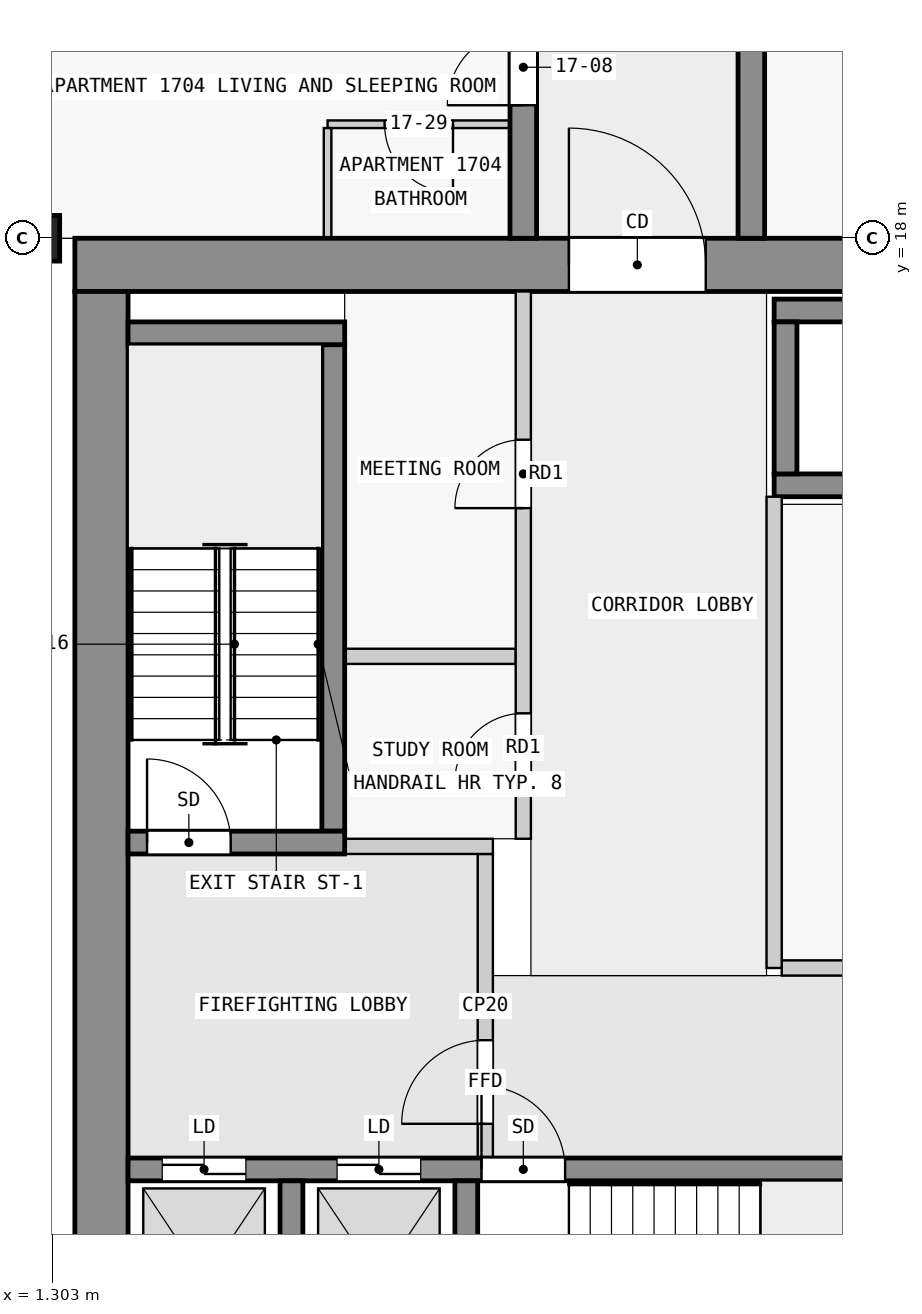
"""IFC4 building model, lengths in metres.
Left out: names, types, materials, properties, quantities, classifications, styles, units other than length and angle.
Written with IfcOpenShell. Run it as: python <this file> out.ifc"""

import sys

from ifc_helpers import new_model, si_unit, direction, frame, frame_2d, origin, origin_2d, place, context, subcontext, project, spatial, rectangle, extrude, element, fill, save


model = new_model("IFC4")
c1 = context("Model", 3, precision=1e-05, world=origin(), true_north=direction((0.0, 1.0)))
c2 = subcontext(c1, "Body", "Model", "MODEL_VIEW")
j1 = project(units=[si_unit("LENGTHUNIT", "METRE"), si_unit("PLANEANGLEUNIT", "RADIAN")], contexts=[c1])
p1 = place(None, origin())
s1 = spatial("IfcSite", under=j1, at=p1, CompositionType="ELEMENT")
p2 = place(p1, origin())
s2 = spatial("IfcBuilding", under=s1, at=p2, CompositionType="ELEMENT")
p3 = place(p2, frame((0.0, 0.0, 68.8)))
s3 = spatial("IfcBuildingStorey", under=s2, at=p3, CompositionType="ELEMENT", Elevation=68.8)
p4 = place(p3, frame((0.7, 18.0, 0.0), z_axis=(0.0, 0.0, 1.0), x_axis=(0.0, 1.0, 0.0)))
e1 = element("IfcColumn", 1, at=p4, inside=s3, PredefinedType="COLUMN", context=c2, shape_type="SweptSolid", body=[
    extrude(rectangle(XDim=0.6, YDim=1.4, at=origin_2d()), origin(), (0.0, 0.0, 1.0), 3.5),
])
p5 = place(p3, frame((1.6, 17.65, 0.0), z_axis=(0.0, 0.0, 1.0), x_axis=(1.0, 0.0, 0.0)))
e2 = element("IfcWall", 2, at=p5, inside=s3, PredefinedType="SHEAR", context=c2, shape_type="SweptSolid", body=[
    extrude(rectangle(XDim=20.9, YDim=0.7, at=frame_2d((10.45, 0.0))), origin(), (0.0, 0.0, 1.0), 3.2),
])
p6 = place(p5, frame((6.5, 0.0, 0.0)))
e3 = element("IfcOpeningElement", 3, at=p6, cuts=e2, PredefinedType="OPENING", context=c2, shape_type="SweptSolid", body=[
    extrude(rectangle(XDim=1.8, YDim=2.1, at=frame_2d((0.9, 1.05))), frame((0.0, 0.36, 0.0), z_axis=(0.0, -1.0, 0.0), x_axis=(1.0, 0.0, 0.0)), (0.0, 0.0, 1.0), 0.72),
])
p7 = place(p3, frame((1.95, 2.5, 0.0), z_axis=(0.0, 0.0, 1.0), x_axis=(0.0, 1.0, 0.0)))
e4 = element("IfcWall", 4, at=p7, inside=s3, PredefinedType="SHEAR", context=c2, shape_type="SweptSolid", body=[
    extrude(rectangle(XDim=14.8, YDim=0.7, at=frame_2d((7.4, 0.0))), origin(), (0.0, 0.0, 1.0), 3.2),
])
for number, where, z_axis, x_axis in (
    (5, (4.45, 2.8, 0.0), (0.0, 0.0, 1.0), (0.0, 1.0, 0.0)),
    (6, (6.75, 2.8, 0.0), (0.0, 0.0, 1.0), (0.0, 1.0, 0.0)),
):
    element("IfcWall", number, at=place(p3, frame(where, z_axis=z_axis, x_axis=x_axis)), inside=s3, PredefinedType="SHEAR", context=c2, shape_type="SweptSolid", body=[
        extrude(rectangle(XDim=2.8, YDim=0.3, at=frame_2d((1.4, 0.0))), origin(), (0.0, 0.0, 1.0), 3.2),
    ])
p8 = place(p3, frame((2.3, 5.75, 0.0), z_axis=(0.0, 0.0, 1.0), x_axis=(1.0, 0.0, 0.0)))
e7 = element("IfcWall", 7, at=p8, inside=s3, PredefinedType="SHEAR", context=c2, shape_type="SweptSolid", body=[
    extrude(rectangle(XDim=18.8, YDim=0.3, at=frame_2d((9.4, 0.0))), origin(), (0.0, 0.0, 1.0), 3.2),
])
p9 = place(p8, frame((4.65, 0.0, 0.0)))
e8 = element("IfcOpeningElement", 8, at=p9, cuts=e7, PredefinedType="OPENING", context=c2, shape_type="SweptSolid", body=[
    extrude(rectangle(XDim=1.1, YDim=2.1, at=frame_2d((0.55, 1.05))), frame((0.0, 0.16, 0.0), z_axis=(0.0, -1.0, 0.0), x_axis=(1.0, 0.0, 0.0)), (0.0, 0.0, 1.0), 0.32),
])
p10 = place(p8, frame((0.45, 0.0, 0.0)))
e9 = element("IfcOpeningElement", 9, at=p10, cuts=e7, PredefinedType="OPENING", context=c2, shape_type="SweptSolid", body=[
    extrude(rectangle(XDim=1.1, YDim=2.1, at=frame_2d((0.55, 1.05))), frame((0.0, 0.16, 0.0), z_axis=(0.0, -1.0, 0.0), x_axis=(1.0, 0.0, 0.0)), (0.0, 0.0, 1.0), 0.32),
])
p11 = place(p8, frame((2.75, 0.0, 0.0)))
e10 = element("IfcOpeningElement", 10, at=p11, cuts=e7, PredefinedType="OPENING", context=c2, shape_type="SweptSolid", body=[
    extrude(rectangle(XDim=1.1, YDim=2.1, at=frame_2d((0.55, 1.05))), frame((0.0, 0.16, 0.0), z_axis=(0.0, -1.0, 0.0), x_axis=(1.0, 0.0, 0.0)), (0.0, 0.0, 1.0), 0.32),
])
p12 = place(p8, frame((11.85, 0.0, 0.0)))
e11 = element("IfcOpeningElement", 11, at=p12, cuts=e7, PredefinedType="OPENING", context=c2, shape_type="SweptSolid", body=[
    extrude(rectangle(XDim=1.1, YDim=2.1, at=frame_2d((0.55, 1.05))), frame((0.0, 0.16, 0.0), z_axis=(0.0, -1.0, 0.0), x_axis=(1.0, 0.0, 0.0)), (0.0, 0.0, 1.0), 0.32),
])
p13 = place(p8, frame((14.35, 0.0, 0.0)))
e12 = element("IfcOpeningElement", 12, at=p13, cuts=e7, PredefinedType="OPENING", context=c2, shape_type="SweptSolid", body=[
    extrude(rectangle(XDim=1.1, YDim=2.1, at=frame_2d((0.55, 1.05))), frame((0.0, 0.16, 0.0), z_axis=(0.0, -1.0, 0.0), x_axis=(1.0, 0.0, 0.0)), (0.0, 0.0, 1.0), 0.32),
])
p14 = place(p8, frame((16.85, 0.0, 0.0)))
e13 = element("IfcOpeningElement", 13, at=p14, cuts=e7, PredefinedType="OPENING", context=c2, shape_type="SweptSolid", body=[
    extrude(rectangle(XDim=1.1, YDim=2.1, at=frame_2d((0.55, 1.05))), frame((0.0, 0.16, 0.0), z_axis=(0.0, -1.0, 0.0), x_axis=(1.0, 0.0, 0.0)), (0.0, 0.0, 1.0), 0.32),
])
p15 = place(p3, frame((2.3, 10.05, 0.0), z_axis=(0.0, 0.0, 1.0), x_axis=(1.0, 0.0, 0.0)))
e14 = element("IfcWall", 14, at=p15, inside=s3, PredefinedType="SHEAR", context=c2, shape_type="SweptSolid", body=[
    extrude(rectangle(XDim=2.85, YDim=0.3, at=frame_2d((1.425, 0.0))), origin(), (0.0, 0.0, 1.0), 3.2),
])
p16 = place(p15, frame((0.25, 0.0, 0.0)))
e15 = element("IfcOpeningElement", 15, at=p16, cuts=e14, PredefinedType="OPENING", context=c2, shape_type="SweptSolid", body=[
    extrude(rectangle(XDim=1.1, YDim=2.1, at=frame_2d((0.55, 1.05))), frame((0.0, 0.16, 0.0), z_axis=(0.0, -1.0, 0.0), x_axis=(1.0, 0.0, 0.0)), (0.0, 0.0, 1.0), 0.32),
])
p17 = place(p3, frame((5.0, 10.2, 0.0), z_axis=(0.0, 0.0, 1.0), x_axis=(0.0, 1.0, 0.0)))
e16 = element("IfcWall", 16, at=p17, inside=s3, PredefinedType="SHEAR", context=c2, shape_type="SweptSolid", body=[
    extrude(rectangle(XDim=6.4, YDim=0.3, at=frame_2d((3.2, 0.0))), origin(), (0.0, 0.0, 1.0), 3.2),
])
p18 = place(p3, frame((2.3, 16.75, 0.0), z_axis=(0.0, 0.0, 1.0), x_axis=(1.0, 0.0, 0.0)))
e17 = element("IfcWall", 17, at=p18, inside=s3, PredefinedType="SHEAR", context=c2, shape_type="SweptSolid", body=[
    extrude(rectangle(XDim=2.85, YDim=0.3, at=frame_2d((1.425, 0.0))), origin(), (0.0, 0.0, 1.0), 3.2),
])
for number, where, z_axis, x_axis in (
    (18, (10.8, 17.05, 0.0), (0.0, 0.0, 1.0), (1.0, 0.0, 0.0)),
    (19, (10.8, 14.75, 0.0), (0.0, 0.0, 1.0), (1.0, 0.0, 0.0)),
):
    element("IfcWall", number, at=place(p3, frame(where, z_axis=z_axis, x_axis=x_axis)), inside=s3, PredefinedType="SHEAR", context=c2, shape_type="SweptSolid", body=[
        extrude(rectangle(XDim=7.8, YDim=0.3, at=frame_2d((3.9, 0.0))), origin(), (0.0, 0.0, 1.0), 3.2),
    ])
p19 = place(p3, frame((10.95, 14.9, 0.0), z_axis=(0.0, 0.0, 1.0), x_axis=(0.0, 1.0, 0.0)))
e20 = element("IfcWall", 20, at=p19, inside=s3, PredefinedType="SHEAR", context=c2, shape_type="SweptSolid", body=[
    extrude(rectangle(XDim=2.0, YDim=0.3, at=frame_2d((1.0, 0.0))), origin(), (0.0, 0.0, 1.0), 3.2),
])
p20 = place(p3, frame((7.5, 18.0, 0.0), z_axis=(0.0, 0.0, 1.0), x_axis=(0.0, 1.0, 0.0)))
e21 = element("IfcWall", 21, at=p20, inside=s3, PredefinedType="SHEAR", context=c2, shape_type="SweptSolid", body=[
    extrude(rectangle(XDim=27.0, YDim=0.35, at=frame_2d((13.5, 0.0))), origin(), (0.0, 0.0, 1.0), 3.2),
])
p21 = place(p20, frame((1.75, 0.0, 0.0)))
e22 = element("IfcOpeningElement", 22, at=p21, cuts=e21, PredefinedType="OPENING", context=c2, shape_type="SweptSolid", body=[
    extrude(rectangle(XDim=1.0, YDim=2.1, at=frame_2d((0.5, 1.05))), frame((0.0, 0.185, 0.0), z_axis=(0.0, -1.0, 0.0), x_axis=(1.0, 0.0, 0.0)), (0.0, 0.0, 1.0), 0.37),
])
p22 = place(p20, frame((6.25, 0.0, 0.0)))
e23 = element("IfcOpeningElement", 23, at=p22, cuts=e21, PredefinedType="OPENING", context=c2, shape_type="SweptSolid", body=[
    extrude(rectangle(XDim=1.0, YDim=2.1, at=frame_2d((0.5, 1.05))), frame((0.0, 0.185, 0.0), z_axis=(0.0, -1.0, 0.0), x_axis=(1.0, 0.0, 0.0)), (0.0, 0.0, 1.0), 0.37),
])
p23 = place(p20, frame((10.75, 0.0, 0.0)))
e24 = element("IfcOpeningElement", 24, at=p23, cuts=e21, PredefinedType="OPENING", context=c2, shape_type="SweptSolid", body=[
    extrude(rectangle(XDim=1.0, YDim=2.1, at=frame_2d((0.5, 1.05))), frame((0.0, 0.185, 0.0), z_axis=(0.0, -1.0, 0.0), x_axis=(1.0, 0.0, 0.0)), (0.0, 0.0, 1.0), 0.37),
])
p24 = place(p20, frame((17.55, 0.0, 0.0)))
e25 = element("IfcOpeningElement", 25, at=p24, cuts=e21, PredefinedType="OPENING", context=c2, shape_type="SweptSolid", body=[
    extrude(rectangle(XDim=1.0, YDim=2.1, at=frame_2d((0.5, 1.05))), frame((0.0, 0.185, 0.0), z_axis=(0.0, -1.0, 0.0), x_axis=(1.0, 0.0, 0.0)), (0.0, 0.0, 1.0), 0.37),
])
p25 = place(p20, frame((23.25, 0.0, 0.0)))
e26 = element("IfcOpeningElement", 26, at=p25, cuts=e21, PredefinedType="OPENING", context=c2, shape_type="SweptSolid", body=[
    extrude(rectangle(XDim=0.9, YDim=2.1, at=frame_2d((0.45, 1.05))), frame((0.0, 0.185, 0.0), z_axis=(0.0, -1.0, 0.0), x_axis=(1.0, 0.0, 0.0)), (0.0, 0.0, 1.0), 0.37),
])
p26 = place(p20, frame((25.45, 0.0, 0.0)))
e27 = element("IfcOpeningElement", 27, at=p26, cuts=e21, PredefinedType="OPENING", context=c2, shape_type="SweptSolid", body=[
    extrude(rectangle(XDim=1.0, YDim=2.1, at=frame_2d((0.5, 1.05))), frame((0.0, 0.185, 0.0), z_axis=(0.0, -1.0, 0.0), x_axis=(1.0, 0.0, 0.0)), (0.0, 0.0, 1.0), 0.37),
])
p27 = place(p3, frame((10.5, 18.0, 0.0), z_axis=(0.0, 0.0, 1.0), x_axis=(0.0, 1.0, 0.0)))
e28 = element("IfcWall", 28, at=p27, inside=s3, PredefinedType="SHEAR", context=c2, shape_type="SweptSolid", body=[
    extrude(rectangle(XDim=27.0, YDim=0.35, at=frame_2d((13.5, 0.0))), origin(), (0.0, 0.0, 1.0), 3.2),
])
p28 = place(p27, frame((4.05, 0.0, 0.0)))
e29 = element("IfcOpeningElement", 29, at=p28, cuts=e28, PredefinedType="OPENING", context=c2, shape_type="SweptSolid", body=[
    extrude(rectangle(XDim=1.0, YDim=2.1, at=frame_2d((0.5, 1.05))), frame((0.0, 0.185, 0.0), z_axis=(0.0, -1.0, 0.0), x_axis=(1.0, 0.0, 0.0)), (0.0, 0.0, 1.0), 0.37),
])
p29 = place(p27, frame((13.05, 0.0, 0.0)))
e30 = element("IfcOpeningElement", 30, at=p29, cuts=e28, PredefinedType="OPENING", context=c2, shape_type="SweptSolid", body=[
    extrude(rectangle(XDim=1.0, YDim=2.1, at=frame_2d((0.5, 1.05))), frame((0.0, 0.185, 0.0), z_axis=(0.0, -1.0, 0.0), x_axis=(1.0, 0.0, 0.0)), (0.0, 0.0, 1.0), 0.37),
])
p30 = place(p27, frame((21.35, 0.0, 0.0)))
e31 = element("IfcOpeningElement", 31, at=p30, cuts=e28, PredefinedType="OPENING", context=c2, shape_type="SweptSolid", body=[
    extrude(rectangle(XDim=1.0, YDim=2.1, at=frame_2d((0.5, 1.05))), frame((0.0, 0.185, 0.0), z_axis=(0.0, -1.0, 0.0), x_axis=(1.0, 0.0, 0.0)), (0.0, 0.0, 1.0), 0.37),
])
p31 = place(p3, frame((7.0, 5.9, 0.0), z_axis=(0.0, 0.0, 1.0), x_axis=(0.0, 1.0, 0.0)))
e32 = element("IfcWall", 32, at=p31, inside=s3, PredefinedType="PARTITIONING", context=c2, shape_type="SweptSolid", body=[
    extrude(rectangle(XDim=4.0, YDim=0.2, at=frame_2d((2.0, 0.0))), origin(), (0.0, 0.0, 1.0), 3.2),
])
p32 = place(p31, frame((0.45, 0.0, 0.0)))
e33 = element("IfcOpeningElement", 33, at=p32, cuts=e32, PredefinedType="OPENING", context=c2, shape_type="SweptSolid", body=[
    extrude(rectangle(XDim=1.1, YDim=2.1, at=frame_2d((0.55, 1.05))), frame((0.0, 0.11, 0.0), z_axis=(0.0, -1.0, 0.0), x_axis=(1.0, 0.0, 0.0)), (0.0, 0.0, 1.0), 0.22),
])
p33 = place(p3, frame((5.15, 10.0, 0.0), z_axis=(0.0, 0.0, 1.0), x_axis=(1.0, 0.0, 0.0)))
e34 = element("IfcWall", 34, at=p33, inside=s3, PredefinedType="PARTITIONING", context=c2, shape_type="SweptSolid", body=[
    extrude(rectangle(XDim=1.95, YDim=0.2, at=frame_2d((0.975, 0.0))), origin(), (0.0, 0.0, 1.0), 3.2),
])
p34 = place(p3, frame((10.8, 8.4, 0.0), z_axis=(0.0, 0.0, 1.0), x_axis=(0.0, 1.0, 0.0)))
e35 = element("IfcWall", 35, at=p34, inside=s3, PredefinedType="PARTITIONING", context=c2, shape_type="SweptSolid", body=[
    extrude(rectangle(XDim=6.2, YDim=0.2, at=frame_2d((3.1, 0.0))), origin(), (0.0, 0.0, 1.0), 3.2),
])
p35 = place(p3, frame((10.9, 8.4, 0.0), z_axis=(0.0, 0.0, 1.0), x_axis=(1.0, 0.0, 0.0)))
e36 = element("IfcWall", 36, at=p35, inside=s3, PredefinedType="PARTITIONING", context=c2, shape_type="SweptSolid", body=[
    extrude(rectangle(XDim=7.4, YDim=0.2, at=frame_2d((3.7, 0.0))), origin(), (0.0, 0.0, 1.0), 3.2),
])
p36 = place(p3, frame((7.5, 10.1, 0.0), z_axis=(0.0, 0.0, 1.0), x_axis=(0.0, 1.0, 0.0)))
e37 = element("IfcWall", 37, at=p36, inside=s3, PredefinedType="PARTITIONING", context=c2, shape_type="SweptSolid", body=[
    extrude(rectangle(XDim=7.2, YDim=0.2, at=frame_2d((3.6, 0.0))), origin(), (0.0, 0.0, 1.0), 3.2),
])
p37 = place(p36, frame((0.75, 0.0, 0.0)))
e38 = element("IfcOpeningElement", 38, at=p37, cuts=e37, PredefinedType="OPENING", context=c2, shape_type="SweptSolid", body=[
    extrude(rectangle(XDim=0.9, YDim=2.1, at=frame_2d((0.45, 1.05))), frame((0.0, 0.11, 0.0), z_axis=(0.0, -1.0, 0.0), x_axis=(1.0, 0.0, 0.0)), (0.0, 0.0, 1.0), 0.22),
])
p38 = place(p36, frame((4.35, 0.0, 0.0)))
e39 = element("IfcOpeningElement", 39, at=p38, cuts=e37, PredefinedType="OPENING", context=c2, shape_type="SweptSolid", body=[
    extrude(rectangle(XDim=0.9, YDim=2.1, at=frame_2d((0.45, 1.05))), frame((0.0, 0.11, 0.0), z_axis=(0.0, -1.0, 0.0), x_axis=(1.0, 0.0, 0.0)), (0.0, 0.0, 1.0), 0.22),
])
p39 = place(p3, frame((5.15, 12.5, 0.0), z_axis=(0.0, 0.0, 1.0), x_axis=(1.0, 0.0, 0.0)))
e40 = element("IfcWall", 40, at=p39, inside=s3, PredefinedType="PARTITIONING", context=c2, shape_type="SweptSolid", body=[
    extrude(rectangle(XDim=2.25, YDim=0.2, at=frame_2d((1.125, 0.0))), origin(), (0.0, 0.0, 1.0), 3.2),
])
p40 = place(p3, frame((7.325, 19.5, 0.0), z_axis=(0.0, 0.0, 1.0), x_axis=(-1.0, 0.0, 0.0)))
e41 = element("IfcWall", 41, at=p40, inside=s3, PredefinedType="PARTITIONING", context=c2, shape_type="SweptSolid", body=[
    extrude(rectangle(XDim=2.4, YDim=0.1, at=frame_2d((1.2, 0.0))), origin(), (0.0, 0.0, 1.0), 3.2),
])
p41 = place(p40, frame((0.75, 0.0, 0.0)))
e42 = element("IfcOpeningElement", 42, at=p41, cuts=e41, PredefinedType="OPENING", context=c2, shape_type="SweptSolid", body=[
    extrude(rectangle(XDim=0.9, YDim=2.1, at=frame_2d((0.45, 1.05))), frame((0.0, 0.06, 0.0), z_axis=(0.0, -1.0, 0.0), x_axis=(1.0, 0.0, 0.0)), (0.0, 0.0, 1.0), 0.12),
])
p42 = place(p3, frame((4.925, 19.45, 0.0), z_axis=(0.0, 0.0, 1.0), x_axis=(0.0, -1.0, 0.0)))
e43 = element("IfcWall", 43, at=p42, inside=s3, PredefinedType="PARTITIONING", context=c2, shape_type="SweptSolid", body=[
    extrude(rectangle(XDim=1.45, YDim=0.1, at=frame_2d((0.725, 0.0))), origin(), (0.0, 0.0, 1.0), 3.2),
])
p43 = place(p32, origin())
e44 = element("IfcDoor", 44, at=p43, inside=s3, OperationType="SINGLE_SWING_LEFT", PredefinedType="DOOR", context=c2, shape_type="SweptSolid", body=[
    extrude(rectangle(XDim=1.1, YDim=2.1, at=frame_2d((0.55, 1.05))), frame((0.0, 0.025, 0.0), z_axis=(0.0, -1.0, 0.0), x_axis=(1.0, 0.0, 0.0)), (0.0, 0.0, 1.0), 0.05),
])
fill(e33, e44)
p44 = place(p16, origin())
e45 = element("IfcDoor", 45, at=p44, inside=s3, OperationType="SINGLE_SWING_RIGHT", PredefinedType="DOOR", context=c2, shape_type="SweptSolid", body=[
    extrude(rectangle(XDim=1.1, YDim=2.1, at=frame_2d((0.55, 1.05))), frame((0.0, 0.025, 0.0), z_axis=(0.0, -1.0, 0.0), x_axis=(1.0, 0.0, 0.0)), (0.0, 0.0, 1.0), 0.05),
])
fill(e15, e45)
p45 = place(p9, origin())
e46 = element("IfcDoor", 46, at=p45, inside=s3, OperationType="SINGLE_SWING_LEFT", PredefinedType="DOOR", context=c2, shape_type="SweptSolid", body=[
    extrude(rectangle(XDim=1.1, YDim=2.1, at=frame_2d((0.55, 1.05))), frame((0.0, 0.025, 0.0), z_axis=(0.0, -1.0, 0.0), x_axis=(1.0, 0.0, 0.0)), (0.0, 0.0, 1.0), 0.05),
])
fill(e8, e46)
p46 = place(p10, origin())
e47 = element("IfcDoor", 47, at=p46, inside=s3, OperationType="DOUBLE_DOOR_SLIDING", PredefinedType="DOOR", context=c2, shape_type="SweptSolid", body=[
    extrude(rectangle(XDim=1.1, YDim=2.1, at=frame_2d((0.55, 1.05))), frame((0.0, 0.025, 0.0), z_axis=(0.0, -1.0, 0.0), x_axis=(1.0, 0.0, 0.0)), (0.0, 0.0, 1.0), 0.05),
])
fill(e9, e47)
p47 = place(p11, origin())
e48 = element("IfcDoor", 48, at=p47, inside=s3, OperationType="DOUBLE_DOOR_SLIDING", PredefinedType="DOOR", context=c2, shape_type="SweptSolid", body=[
    extrude(rectangle(XDim=1.1, YDim=2.1, at=frame_2d((0.55, 1.05))), frame((0.0, 0.025, 0.0), z_axis=(0.0, -1.0, 0.0), x_axis=(1.0, 0.0, 0.0)), (0.0, 0.0, 1.0), 0.05),
])
fill(e10, e48)
p48 = place(p6, origin())
e49 = element("IfcDoor", 49, at=p48, inside=s3, OperationType="DOUBLE_DOOR_SINGLE_SWING", PredefinedType="DOOR", context=c2, shape_type="SweptSolid", body=[
    extrude(rectangle(XDim=1.8, YDim=2.1, at=frame_2d((0.9, 1.05))), frame((0.0, 0.025, 0.0), z_axis=(0.0, -1.0, 0.0), x_axis=(1.0, 0.0, 0.0)), (0.0, 0.0, 1.0), 0.05),
])
fill(e3, e49)
p49 = place(p37, origin())
e50 = element("IfcDoor", 50, at=p49, inside=s3, OperationType="SINGLE_SWING_RIGHT", PredefinedType="DOOR", context=c2, shape_type="SweptSolid", body=[
    extrude(rectangle(XDim=0.9, YDim=2.1, at=frame_2d((0.45, 1.05))), frame((0.0, 0.025, 0.0), z_axis=(0.0, -1.0, 0.0), x_axis=(1.0, 0.0, 0.0)), (0.0, 0.0, 1.0), 0.05),
])
fill(e38, e50)
p50 = place(p38, origin())
e51 = element("IfcDoor", 51, at=p50, inside=s3, OperationType="SINGLE_SWING_RIGHT", PredefinedType="DOOR", context=c2, shape_type="SweptSolid", body=[
    extrude(rectangle(XDim=0.9, YDim=2.1, at=frame_2d((0.45, 1.05))), frame((0.0, 0.025, 0.0), z_axis=(0.0, -1.0, 0.0), x_axis=(1.0, 0.0, 0.0)), (0.0, 0.0, 1.0), 0.05),
])
fill(e39, e51)
p51 = place(p21, origin())
e52 = element("IfcDoor", 52, at=p51, inside=s3, OperationType="SINGLE_SWING_LEFT", PredefinedType="DOOR", context=c2, shape_type="SweptSolid", body=[
    extrude(rectangle(XDim=1.0, YDim=2.1, at=frame_2d((0.5, 1.05))), frame((0.0, 0.025, 0.0), z_axis=(0.0, -1.0, 0.0), x_axis=(1.0, 0.0, 0.0)), (0.0, 0.0, 1.0), 0.05),
])
fill(e22, e52)
p52 = place(p41, origin())
e53 = element("IfcDoor", 53, at=p52, inside=s3, OperationType="SINGLE_SWING_LEFT", PredefinedType="DOOR", context=c2, shape_type="SweptSolid", body=[
    extrude(rectangle(XDim=0.9, YDim=2.1, at=frame_2d((0.45, 1.05))), frame((0.0, 0.025, 0.0), z_axis=(0.0, -1.0, 0.0), x_axis=(1.0, 0.0, 0.0)), (0.0, 0.0, 1.0), 0.05),
])
fill(e42, e53)
save(model, sys.argv[1])
